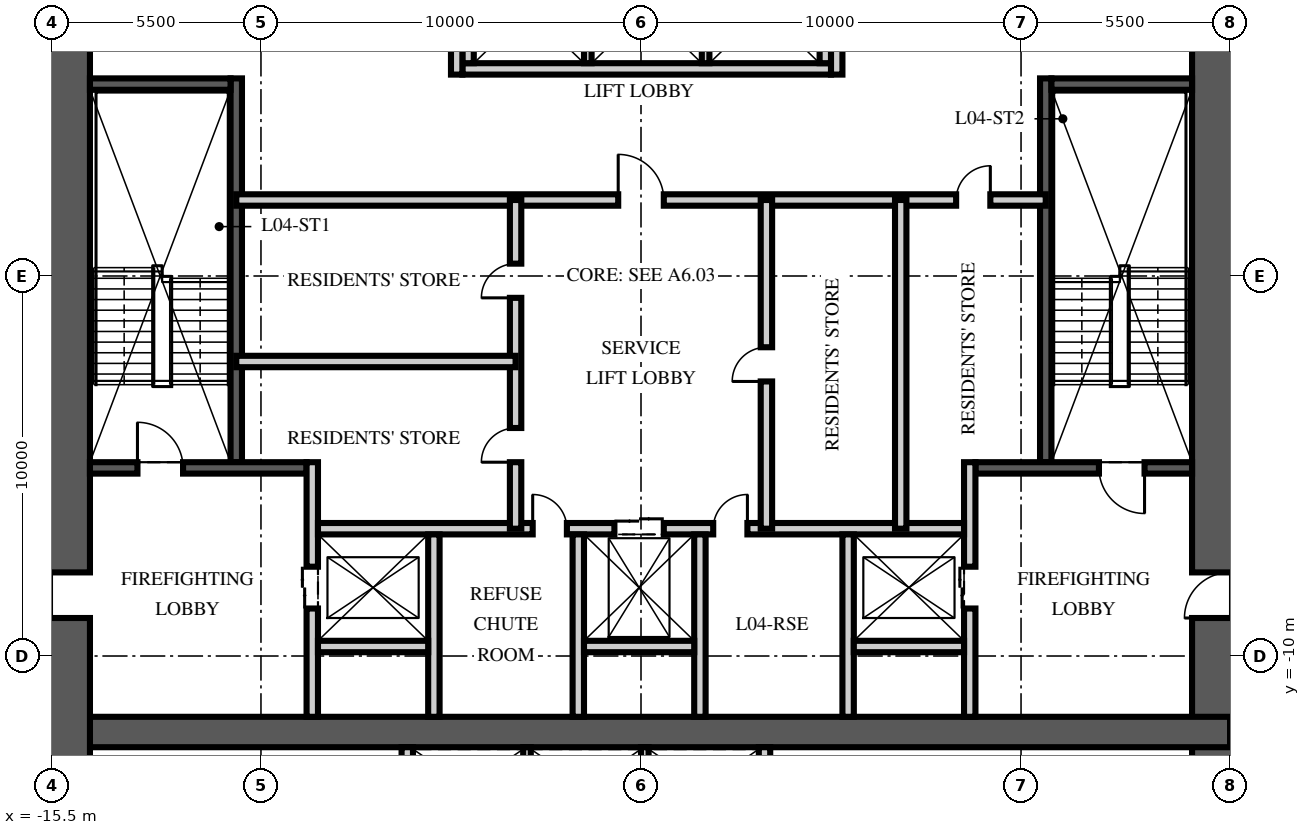
"""IFC4 building model, lengths in metres.
Left out: names, types, materials, properties, quantities, classifications, styles, units other than length and angle.
Written with IfcOpenShell. Run it as: python <this file> out.ifc"""

import sys

from ifc_helpers import new_model, si_unit, direction, frame, frame_2d, origin, place, context, subcontext, project, spatial, rectangle, extrude, element, fill, save


model = new_model("IFC4")
c1 = context("Model", 3, precision=1e-05, world=origin(), true_north=direction((0.0, 1.0)))
c2 = subcontext(c1, "Body", "Model", "MODEL_VIEW")
j1 = project(units=[si_unit("LENGTHUNIT", "METRE"), si_unit("PLANEANGLEUNIT", "RADIAN")], contexts=[c1])
p1 = place(None, origin())
s1 = spatial("IfcSite", under=j1, at=p1, CompositionType="ELEMENT")
p2 = place(p1, origin())
s2 = spatial("IfcBuilding", under=s1, at=p2, CompositionType="ELEMENT")
p3 = place(p2, frame((0.0, 0.0, 21.0)))
s3 = spatial("IfcBuildingStorey", under=s2, at=p3, CompositionType="ELEMENT", Elevation=21.0)
p4 = place(p3, frame((15.5, -15.5, -0.25), z_axis=(0.0, 0.0, 1.0), x_axis=(0.0, 1.0, 0.0)))
e1 = element("IfcWall", 1, at=p4, inside=s3, PredefinedType="SHEAR", context=c2, shape_type="SweptSolid", body=[
    extrude(rectangle(XDim=31.0, YDim=2.0, at=frame_2d((15.5, 0.0))), origin(), (0.0, 0.0, 1.0), 3.75),
])
p5 = place(p4, frame((6.5, 0.0, 0.25)))
e2 = element("IfcOpeningElement", 2, at=p5, cuts=e1, PredefinedType="OPENING", context=c2, shape_type="SweptSolid", body=[
    extrude(rectangle(XDim=1.2, YDim=2.1, at=frame_2d((0.6, 1.05))), frame((0.0, 1.01, 0.0), z_axis=(0.0, -1.0, 0.0), x_axis=(1.0, 0.0, 0.0)), (0.0, 0.0, 1.0), 2.02),
])
p6 = place(p4, frame((23.0, 0.0, 0.25)))
e3 = element("IfcOpeningElement", 3, at=p6, cuts=e1, PredefinedType="OPENING", context=c2, shape_type="SweptSolid", body=[
    extrude(rectangle(XDim=1.8, YDim=2.1, at=frame_2d((0.9, 1.05))), frame((0.0, 1.01, 0.0), z_axis=(0.0, -1.0, 0.0), x_axis=(1.0, 0.0, 0.0)), (0.0, 0.0, 1.0), 2.02),
])
p7 = place(p3, frame((-15.5, -12.0, -0.25), z_axis=(0.0, 0.0, 1.0), x_axis=(1.0, 0.0, 0.0)))
e4 = element("IfcWall", 4, at=p7, inside=s3, PredefinedType="SHEAR", context=c2, shape_type="SweptSolid", body=[
    extrude(rectangle(XDim=31.0, YDim=0.8, at=frame_2d((15.5, 0.0))), origin(), (0.0, 0.0, 1.0), 3.75),
])
p8 = place(p3, frame((-15.5, -15.5, -0.25), z_axis=(0.0, 0.0, 1.0), x_axis=(0.0, 1.0, 0.0)))
e5 = element("IfcWall", 5, at=p8, inside=s3, PredefinedType="SHEAR", context=c2, shape_type="SweptSolid", body=[
    extrude(rectangle(XDim=31.0, YDim=2.0, at=frame_2d((15.5, 0.0))), origin(), (0.0, 0.0, 1.0), 3.75),
])
p9 = place(p8, frame((6.5, 0.0, 0.25)))
e6 = element("IfcOpeningElement", 6, at=p9, cuts=e5, PredefinedType="OPENING", context=c2, shape_type="SweptSolid", body=[
    extrude(rectangle(XDim=1.2, YDim=2.1, at=frame_2d((0.6, 1.05))), frame((0.0, 1.01, 0.0), z_axis=(0.0, -1.0, 0.0), x_axis=(1.0, 0.0, 0.0)), (0.0, 0.0, 1.0), 2.02),
])
p10 = place(p8, frame((23.0, 0.0, 0.25)))
e7 = element("IfcOpeningElement", 7, at=p10, cuts=e5, PredefinedType="OPENING", context=c2, shape_type="SweptSolid", body=[
    extrude(rectangle(XDim=1.8, YDim=2.1, at=frame_2d((0.9, 1.05))), frame((0.0, 1.01, 0.0), z_axis=(0.0, -1.0, 0.0), x_axis=(1.0, 0.0, 0.0)), (0.0, 0.0, 1.0), 2.02),
])
p11 = place(p3, frame((-10.65, -4.9, 0.0), z_axis=(0.0, 0.0, 1.0), x_axis=(0.0, 1.0, 0.0)))
e8 = element("IfcWall", 8, at=p11, inside=s3, PredefinedType="SOLIDWALL", context=c2, shape_type="SweptSolid", body=[
    extrude(rectangle(XDim=10.1, YDim=0.3, at=frame_2d((5.05, 0.0))), origin(), (0.0, 0.0, 1.0), 3.5),
])
p12 = place(p3, frame((-14.5, -5.05, 0.0), z_axis=(0.0, 0.0, 1.0), x_axis=(1.0, 0.0, 0.0)))
e9 = element("IfcWall", 9, at=p12, inside=s3, PredefinedType="SOLIDWALL", context=c2, shape_type="SweptSolid", body=[
    extrude(rectangle(XDim=5.7, YDim=0.3, at=frame_2d((2.85, 0.0))), origin(), (0.0, 0.0, 1.0), 3.5),
])
p13 = place(p12, frame((1.25, 0.0, 0.0)))
e10 = element("IfcOpeningElement", 10, at=p13, cuts=e9, PredefinedType="OPENING", context=c2, shape_type="SweptSolid", body=[
    extrude(rectangle(XDim=1.2, YDim=2.1, at=frame_2d((0.6, 1.05))), frame((0.0, 0.16, 0.0), z_axis=(0.0, -1.0, 0.0), x_axis=(1.0, 0.0, 0.0)), (0.0, 0.0, 1.0), 0.32),
])
p14 = place(p3, frame((-14.5, 5.05, 0.0), z_axis=(0.0, 0.0, 1.0), x_axis=(1.0, 0.0, 0.0)))
e11 = element("IfcWall", 11, at=p14, inside=s3, PredefinedType="SOLIDWALL", context=c2, shape_type="SweptSolid", body=[
    extrude(rectangle(XDim=3.7, YDim=0.3, at=frame_2d((1.85, 0.0))), origin(), (0.0, 0.0, 1.0), 3.5),
])
p15 = place(p3, frame((-8.65, -11.6, 0.0), z_axis=(0.0, 0.0, 1.0), x_axis=(0.0, 1.0, 0.0)))
e12 = element("IfcWall", 12, at=p15, inside=s3, PredefinedType="PARTITIONING", context=c2, shape_type="SweptSolid", body=[
    extrude(rectangle(XDim=6.7, YDim=0.3, at=frame_2d((3.35, 0.0))), origin(), (0.0, 0.0, 1.0), 3.5),
])
p16 = place(p15, frame((2.85, 0.0, 0.0)))
e13 = element("IfcOpeningElement", 13, at=p16, cuts=e12, PredefinedType="OPENING", context=c2, shape_type="SweptSolid", body=[
    extrude(rectangle(XDim=1.1, YDim=2.1, at=frame_2d((0.55, 1.05))), frame((0.0, 0.16, 0.0), z_axis=(0.0, -1.0, 0.0), x_axis=(1.0, 0.0, 0.0)), (0.0, 0.0, 1.0), 0.32),
])
p17 = place(p3, frame((10.65, -4.9, 0.0), z_axis=(0.0, 0.0, 1.0), x_axis=(0.0, 1.0, 0.0)))
e14 = element("IfcWall", 14, at=p17, inside=s3, PredefinedType="SOLIDWALL", context=c2, shape_type="SweptSolid", body=[
    extrude(rectangle(XDim=10.1, YDim=0.3, at=frame_2d((5.05, 0.0))), origin(), (0.0, 0.0, 1.0), 3.5),
])
p18 = place(p3, frame((14.5, -5.05, 0.0), z_axis=(0.0, 0.0, 1.0), x_axis=(-1.0, 0.0, 0.0)))
e15 = element("IfcWall", 15, at=p18, inside=s3, PredefinedType="SOLIDWALL", context=c2, shape_type="SweptSolid", body=[
    extrude(rectangle(XDim=5.7, YDim=0.3, at=frame_2d((2.85, 0.0))), origin(), (0.0, 0.0, 1.0), 3.5),
])
p19 = place(p18, frame((1.25, 0.0, 0.0)))
e16 = element("IfcOpeningElement", 16, at=p19, cuts=e15, PredefinedType="OPENING", context=c2, shape_type="SweptSolid", body=[
    extrude(rectangle(XDim=1.2, YDim=2.1, at=frame_2d((0.6, 1.05))), frame((0.0, 0.16, 0.0), z_axis=(0.0, -1.0, 0.0), x_axis=(1.0, 0.0, 0.0)), (0.0, 0.0, 1.0), 0.32),
])
p20 = place(p3, frame((14.5, 5.05, 0.0), z_axis=(0.0, 0.0, 1.0), x_axis=(-1.0, 0.0, 0.0)))
e17 = element("IfcWall", 17, at=p20, inside=s3, PredefinedType="SOLIDWALL", context=c2, shape_type="SweptSolid", body=[
    extrude(rectangle(XDim=3.7, YDim=0.3, at=frame_2d((1.85, 0.0))), origin(), (0.0, 0.0, 1.0), 3.5),
])
p21 = place(p3, frame((8.65, -11.6, 0.0), z_axis=(0.0, 0.0, 1.0), x_axis=(0.0, 1.0, 0.0)))
e18 = element("IfcWall", 18, at=p21, inside=s3, PredefinedType="PARTITIONING", context=c2, shape_type="SweptSolid", body=[
    extrude(rectangle(XDim=6.7, YDim=0.3, at=frame_2d((3.35, 0.0))), origin(), (0.0, 0.0, 1.0), 3.5),
])
p22 = place(p21, frame((2.85, 0.0, 0.0)))
e19 = element("IfcOpeningElement", 19, at=p22, cuts=e18, PredefinedType="OPENING", context=c2, shape_type="SweptSolid", body=[
    extrude(rectangle(XDim=1.1, YDim=2.1, at=frame_2d((0.55, 1.05))), frame((0.0, 0.16, 0.0), z_axis=(0.0, -1.0, 0.0), x_axis=(1.0, 0.0, 0.0)), (0.0, 0.0, 1.0), 0.32),
])
p23 = place(p3, frame((-8.5, -6.65, 0.0), z_axis=(0.0, 0.0, 1.0), x_axis=(1.0, 0.0, 0.0)))
e20 = element("IfcWall", 20, at=p23, inside=s3, PredefinedType="PARTITIONING", context=c2, shape_type="SweptSolid", body=[
    extrude(rectangle(XDim=17.0, YDim=0.3, at=frame_2d((8.5, 0.0))), origin(), (0.0, 0.0, 1.0), 3.5),
])
p24 = place(p23, frame((7.8, 0.0, 0.0)))
e21 = element("IfcOpeningElement", 21, at=p24, cuts=e20, PredefinedType="OPENING", context=c2, shape_type="SweptSolid", body=[
    extrude(rectangle(XDim=1.3, YDim=2.4, at=frame_2d((0.65, 1.2))), frame((0.0, 0.16, 0.0), z_axis=(0.0, -1.0, 0.0), x_axis=(1.0, 0.0, 0.0)), (0.0, 0.0, 1.0), 0.32),
])
p25 = place(p23, frame((5.65, 0.0, 0.0)))
e22 = element("IfcOpeningElement", 22, at=p25, cuts=e20, PredefinedType="OPENING", context=c2, shape_type="SweptSolid", body=[
    extrude(rectangle(XDim=0.9, YDim=2.1, at=frame_2d((0.45, 1.05))), frame((0.0, 0.16, 0.0), z_axis=(0.0, -1.0, 0.0), x_axis=(1.0, 0.0, 0.0)), (0.0, 0.0, 1.0), 0.32),
])
p26 = place(p23, frame((10.4, 0.0, 0.0)))
e23 = element("IfcOpeningElement", 23, at=p26, cuts=e20, PredefinedType="OPENING", context=c2, shape_type="SweptSolid", body=[
    extrude(rectangle(XDim=0.9, YDim=2.1, at=frame_2d((0.45, 1.05))), frame((0.0, 0.16, 0.0), z_axis=(0.0, -1.0, 0.0), x_axis=(1.0, 0.0, 0.0)), (0.0, 0.0, 1.0), 0.32),
])
for number, where, z_axis, x_axis in (
    (24, (-5.45, -11.6, 0.0), (0.0, 0.0, 1.0), (0.0, 1.0, 0.0)),
    (25, (-1.65, -11.6, 0.0), (0.0, 0.0, 1.0), (0.0, 1.0, 0.0)),
    (26, (1.55, -11.6, 0.0), (0.0, 0.0, 1.0), (0.0, 1.0, 0.0)),
    (27, (5.45, -11.6, 0.0), (0.0, 0.0, 1.0), (0.0, 1.0, 0.0)),
):
    element("IfcWall", number, at=place(p3, frame(where, z_axis=z_axis, x_axis=x_axis)), inside=s3, PredefinedType="PARTITIONING", context=c2, shape_type="SweptSolid", body=[
        extrude(rectangle(XDim=4.8, YDim=0.3, at=frame_2d((2.4, 0.0))), origin(), (0.0, 0.0, 1.0), 3.5),
    ])
for number, where, z_axis, x_axis in (
    (28, (-8.5, -9.75, 0.0), (0.0, 0.0, 1.0), (1.0, 0.0, 0.0)),
    (29, (-1.5, -9.75, 0.0), (0.0, 0.0, 1.0), (1.0, 0.0, 0.0)),
    (30, (5.6, -9.75, 0.0), (0.0, 0.0, 1.0), (1.0, 0.0, 0.0)),
):
    element("IfcWall", number, at=place(p3, frame(where, z_axis=z_axis, x_axis=x_axis)), inside=s3, PredefinedType="PARTITIONING", context=c2, shape_type="SweptSolid", body=[
        extrude(rectangle(XDim=2.9, YDim=0.3, at=frame_2d((1.45, 0.0))), origin(), (0.0, 0.0, 1.0), 3.5),
    ])
p27 = place(p3, frame((-4.7, 5.45, 0.0), z_axis=(0.0, 0.0, 1.0), x_axis=(1.0, 0.0, 0.0)))
e31 = element("IfcWall", 31, at=p27, inside=s3, PredefinedType="PARTITIONING", context=c2, shape_type="SweptSolid", body=[
    extrude(rectangle(XDim=9.7, YDim=0.3, at=frame_2d((4.85, 0.0))), origin(), (0.0, 0.0, 1.0), 3.5),
])
for number, where, z_axis, x_axis in (
    (32, (-4.55, 5.6, 0.0), (0.0, 0.0, 1.0), (0.0, 1.0, 0.0)),
    (33, (4.85, 5.6, 0.0), (0.0, 0.0, 1.0), (0.0, 1.0, 0.0)),
):
    element("IfcWall", number, at=place(p3, frame(where, z_axis=z_axis, x_axis=x_axis)), inside=s3, PredefinedType="PARTITIONING", context=c2, shape_type="SweptSolid", body=[
        extrude(rectangle(XDim=2.8, YDim=0.3, at=frame_2d((1.4, 0.0))), origin(), (0.0, 0.0, 1.0), 3.5),
    ])
for number, where, z_axis, x_axis in (
    (34, (-1.4, 5.6, 0.0), (0.0, 0.0, 1.0), (0.0, 1.0, 0.0)),
    (35, (1.7, 5.6, 0.0), (0.0, 0.0, 1.0), (0.0, 1.0, 0.0)),
):
    element("IfcWall", number, at=place(p3, frame(where, z_axis=z_axis, x_axis=x_axis)), inside=s3, PredefinedType="PARTITIONING", context=c2, shape_type="SweptSolid", body=[
        extrude(rectangle(XDim=2.8, YDim=0.2, at=frame_2d((1.4, 0.0))), origin(), (0.0, 0.0, 1.0), 3.5),
    ])
for number, where, z_axis, x_axis in (
    (36, (-6.15, -14.5, 0.0), (0.0, 0.0, 1.0), (0.0, 1.0, 0.0)),
    (37, (3.25, -14.5, 0.0), (0.0, 0.0, 1.0), (0.0, 1.0, 0.0)),
):
    element("IfcWall", number, at=place(p3, frame(where, z_axis=z_axis, x_axis=x_axis)), inside=s3, PredefinedType="PARTITIONING", context=c2, shape_type="SweptSolid", body=[
        extrude(rectangle(XDim=2.1, YDim=0.3, at=frame_2d((1.05, 0.0))), origin(), (0.0, 0.0, 1.0), 3.5),
    ])
for number, where, z_axis, x_axis in (
    (38, (-3.0, -14.5, 0.0), (0.0, 0.0, 1.0), (0.0, 1.0, 0.0)),
    (39, (0.1, -14.5, 0.0), (0.0, 0.0, 1.0), (0.0, 1.0, 0.0)),
):
    element("IfcWall", number, at=place(p3, frame(where, z_axis=z_axis, x_axis=x_axis)), inside=s3, PredefinedType="PARTITIONING", context=c2, shape_type="SweptSolid", body=[
        extrude(rectangle(XDim=2.1, YDim=0.2, at=frame_2d((1.05, 0.0))), origin(), (0.0, 0.0, 1.0), 3.5),
    ])
p28 = place(p3, frame((-10.65, 2.0, 0.0), z_axis=(0.0, 0.0, 1.0), x_axis=(1.0, 0.0, 0.0)))
e40 = element("IfcWall", 40, at=p28, inside=s3, PredefinedType="PARTITIONING", context=c2, shape_type="SweptSolid", body=[
    extrude(rectangle(XDim=21.3, YDim=0.3, at=frame_2d((10.65, 0.0))), origin(), (0.0, 0.0, 1.0), 3.5),
])
p29 = place(p28, frame((10.05, 0.0, 0.0)))
e41 = element("IfcOpeningElement", 41, at=p29, cuts=e40, PredefinedType="OPENING", context=c2, shape_type="SweptSolid", body=[
    extrude(rectangle(XDim=1.2, YDim=2.1, at=frame_2d((0.6, 1.05))), frame((0.0, 0.16, 0.0), z_axis=(0.0, -1.0, 0.0), x_axis=(1.0, 0.0, 0.0)), (0.0, 0.0, 1.0), 0.32),
])
p30 = place(p28, frame((18.942, 0.0, 0.0)))
e42 = element("IfcOpeningElement", 42, at=p30, cuts=e40, PredefinedType="OPENING", context=c2, shape_type="SweptSolid", body=[
    extrude(rectangle(XDim=0.9, YDim=2.1, at=frame_2d((0.45, 1.05))), frame((0.0, 0.16, 0.0), z_axis=(0.0, -1.0, 0.0), x_axis=(1.0, 0.0, 0.0)), (0.0, 0.0, 1.0), 0.32),
])
p31 = place(p3, frame((-3.3, -6.65, 0.0), z_axis=(0.0, 0.0, 1.0), x_axis=(0.0, 1.0, 0.0)))
e43 = element("IfcWall", 43, at=p31, inside=s3, PredefinedType="PARTITIONING", context=c2, shape_type="SweptSolid", body=[
    extrude(rectangle(XDim=8.65, YDim=0.3, at=frame_2d((4.325, 0.0))), origin(), (0.0, 0.0, 1.0), 3.5),
])
p32 = place(p31, frame((1.75, 0.0, 0.0)))
e44 = element("IfcOpeningElement", 44, at=p32, cuts=e43, PredefinedType="OPENING", context=c2, shape_type="SweptSolid", body=[
    extrude(rectangle(XDim=0.9, YDim=2.1, at=frame_2d((0.45, 1.05))), frame((0.0, 0.16, 0.0), z_axis=(0.0, -1.0, 0.0), x_axis=(1.0, 0.0, 0.0)), (0.0, 0.0, 1.0), 0.32),
])
p33 = place(p31, frame((6.075, 0.0, 0.0)))
e45 = element("IfcOpeningElement", 45, at=p33, cuts=e43, PredefinedType="OPENING", context=c2, shape_type="SweptSolid", body=[
    extrude(rectangle(XDim=0.9, YDim=2.1, at=frame_2d((0.45, 1.05))), frame((0.0, 0.16, 0.0), z_axis=(0.0, -1.0, 0.0), x_axis=(1.0, 0.0, 0.0)), (0.0, 0.0, 1.0), 0.32),
])
p34 = place(p3, frame((3.3, -6.65, 0.0), z_axis=(0.0, 0.0, 1.0), x_axis=(0.0, 1.0, 0.0)))
e46 = element("IfcWall", 46, at=p34, inside=s3, PredefinedType="PARTITIONING", context=c2, shape_type="SweptSolid", body=[
    extrude(rectangle(XDim=8.65, YDim=0.3, at=frame_2d((4.325, 0.0))), origin(), (0.0, 0.0, 1.0), 3.5),
])
p35 = place(p34, frame((3.875, 0.0, 0.0)))
e47 = element("IfcOpeningElement", 47, at=p35, cuts=e46, PredefinedType="OPENING", context=c2, shape_type="SweptSolid", body=[
    extrude(rectangle(XDim=0.9, YDim=2.1, at=frame_2d((0.45, 1.05))), frame((0.0, 0.16, 0.0), z_axis=(0.0, -1.0, 0.0), x_axis=(1.0, 0.0, 0.0)), (0.0, 0.0, 1.0), 0.32),
])
p36 = place(p3, frame((-10.65, -2.25, 0.0), z_axis=(0.0, 0.0, 1.0), x_axis=(1.0, 0.0, 0.0)))
e48 = element("IfcWall", 48, at=p36, inside=s3, PredefinedType="PARTITIONING", context=c2, shape_type="SweptSolid", body=[
    extrude(rectangle(XDim=7.35, YDim=0.3, at=frame_2d((3.675, 0.0))), origin(), (0.0, 0.0, 1.0), 3.5),
])
p37 = place(p3, frame((6.834, -6.65, 0.0), z_axis=(0.0, 0.0, 1.0), x_axis=(0.0, 1.0, 0.0)))
e49 = element("IfcWall", 49, at=p37, inside=s3, PredefinedType="PARTITIONING", context=c2, shape_type="SweptSolid", body=[
    extrude(rectangle(XDim=8.65, YDim=0.3, at=frame_2d((4.325, 0.0))), origin(), (0.0, 0.0, 1.0), 3.5),
])
p38 = place(p3, frame((-4.85, 5.3, 0.0), z_axis=(0.0, 0.0, 1.0), x_axis=(0.0, 1.0, 0.0)))
e50 = element("IfcWall", 50, at=p38, inside=s3, PredefinedType="PARTITIONING", context=c2, shape_type="SweptSolid", body=[
    extrude(rectangle(XDim=6.3, YDim=0.3, at=frame_2d((3.15, 0.0))), origin(), (0.0, 0.0, 1.0), 3.5),
])
p39 = place(p38, frame((4.35, 0.0, 0.0)))
e51 = element("IfcOpeningElement", 51, at=p39, cuts=e50, PredefinedType="OPENING", context=c2, shape_type="SweptSolid", body=[
    extrude(rectangle(XDim=0.9, YDim=2.1, at=frame_2d((0.45, 1.05))), frame((0.0, 0.16, 0.0), z_axis=(0.0, -1.0, 0.0), x_axis=(1.0, 0.0, 0.0)), (0.0, 0.0, 1.0), 0.32),
])
p40 = place(p3, frame((5.15, 5.3, 0.0), z_axis=(0.0, 0.0, 1.0), x_axis=(0.0, 1.0, 0.0)))
e52 = element("IfcWall", 52, at=p40, inside=s3, PredefinedType="PARTITIONING", context=c2, shape_type="SweptSolid", body=[
    extrude(rectangle(XDim=6.3, YDim=0.3, at=frame_2d((3.15, 0.0))), origin(), (0.0, 0.0, 1.0), 3.5),
])
p41 = place(p13, origin())
e53 = element("IfcDoor", 53, at=p41, inside=s3, OperationType="SINGLE_SWING_LEFT", PredefinedType="DOOR", context=c2, shape_type="SweptSolid", body=[
    extrude(rectangle(XDim=1.2, YDim=2.1, at=frame_2d((0.6, 1.05))), frame((0.0, 0.025, 0.0), z_axis=(0.0, -1.0, 0.0), x_axis=(1.0, 0.0, 0.0)), (0.0, 0.0, 1.0), 0.05),
])
fill(e10, e53)
p42 = place(p9, origin())
e54 = element("IfcDoor", 54, at=p42, inside=s3, OperationType="SINGLE_SWING_LEFT", PredefinedType="DOOR", context=c2, shape_type="SweptSolid", body=[
    extrude(rectangle(XDim=1.2, YDim=2.1, at=frame_2d((0.6, 1.05))), frame((0.0, 0.025, 0.0), z_axis=(0.0, -1.0, 0.0), x_axis=(1.0, 0.0, 0.0)), (0.0, 0.0, 1.0), 0.05),
])
fill(e6, e54)
p43 = place(p19, origin())
e55 = element("IfcDoor", 55, at=p43, inside=s3, OperationType="SINGLE_SWING_LEFT", PredefinedType="DOOR", context=c2, shape_type="SweptSolid", body=[
    extrude(rectangle(XDim=1.2, YDim=2.1, at=frame_2d((0.6, 1.05))), frame((0.0, 0.025, 0.0), z_axis=(0.0, -1.0, 0.0), x_axis=(1.0, 0.0, 0.0)), (0.0, 0.0, 1.0), 0.05),
])
fill(e16, e55)
p44 = place(p5, origin())
e56 = element("IfcDoor", 56, at=p44, inside=s3, OperationType="SINGLE_SWING_LEFT", PredefinedType="DOOR", context=c2, shape_type="SweptSolid", body=[
    extrude(rectangle(XDim=1.2, YDim=2.1, at=frame_2d((0.6, 1.05))), frame((0.0, 0.025, 0.0), z_axis=(0.0, -1.0, 0.0), x_axis=(1.0, 0.0, 0.0)), (0.0, 0.0, 1.0), 0.05),
])
fill(e2, e56)
p45 = place(p16, origin())
e57 = element("IfcDoor", 57, at=p45, inside=s3, OperationType="DOUBLE_DOOR_SLIDING", PredefinedType="DOOR", context=c2, shape_type="SweptSolid", body=[
    extrude(rectangle(XDim=1.1, YDim=2.1, at=frame_2d((0.55, 1.05))), frame((0.0, 0.025, 0.0), z_axis=(0.0, -1.0, 0.0), x_axis=(1.0, 0.0, 0.0)), (0.0, 0.0, 1.0), 0.05),
])
fill(e13, e57)
p46 = place(p22, origin())
e58 = element("IfcDoor", 58, at=p46, inside=s3, OperationType="DOUBLE_DOOR_SLIDING", PredefinedType="DOOR", context=c2, shape_type="SweptSolid", body=[
    extrude(rectangle(XDim=1.1, YDim=2.1, at=frame_2d((0.55, 1.05))), frame((0.0, 0.025, 0.0), z_axis=(0.0, -1.0, 0.0), x_axis=(1.0, 0.0, 0.0)), (0.0, 0.0, 1.0), 0.05),
])
fill(e19, e58)
p47 = place(p24, origin())
e59 = element("IfcDoor", 59, at=p47, inside=s3, OperationType="DOUBLE_DOOR_SLIDING", PredefinedType="DOOR", context=c2, shape_type="SweptSolid", body=[
    extrude(rectangle(XDim=1.3, YDim=2.4, at=frame_2d((0.65, 1.2))), frame((0.0, 0.025, 0.0), z_axis=(0.0, -1.0, 0.0), x_axis=(1.0, 0.0, 0.0)), (0.0, 0.0, 1.0), 0.05),
])
fill(e21, e59)
p48 = place(p29, origin())
e60 = element("IfcDoor", 60, at=p48, inside=s3, OperationType="SINGLE_SWING_LEFT", PredefinedType="DOOR", context=c2, shape_type="SweptSolid", body=[
    extrude(rectangle(XDim=1.2, YDim=2.1, at=frame_2d((0.6, 1.05))), frame((0.0, 0.025, 0.0), z_axis=(0.0, -1.0, 0.0), x_axis=(1.0, 0.0, 0.0)), (0.0, 0.0, 1.0), 0.05),
])
fill(e41, e60)
p49 = place(p25, origin())
e61 = element("IfcDoor", 61, at=p49, inside=s3, OperationType="SINGLE_SWING_LEFT", PredefinedType="DOOR", context=c2, shape_type="SweptSolid", body=[
    extrude(rectangle(XDim=0.9, YDim=2.1, at=frame_2d((0.45, 1.05))), frame((0.0, 0.025, 0.0), z_axis=(0.0, -1.0, 0.0), x_axis=(1.0, 0.0, 0.0)), (0.0, 0.0, 1.0), 0.05),
])
fill(e22, e61)
p50 = place(p26, origin())
e62 = element("IfcDoor", 62, at=p50, inside=s3, OperationType="SINGLE_SWING_RIGHT", PredefinedType="DOOR", context=c2, shape_type="SweptSolid", body=[
    extrude(rectangle(XDim=0.9, YDim=2.1, at=frame_2d((0.45, 1.05))), frame((0.0, 0.025, 0.0), z_axis=(0.0, -1.0, 0.0), x_axis=(1.0, 0.0, 0.0)), (0.0, 0.0, 1.0), 0.05),
])
fill(e23, e62)
p51 = place(p32, origin())
e63 = element("IfcDoor", 63, at=p51, inside=s3, OperationType="SINGLE_SWING_LEFT", PredefinedType="DOOR", context=c2, shape_type="SweptSolid", body=[
    extrude(rectangle(XDim=0.9, YDim=2.1, at=frame_2d((0.45, 1.05))), frame((0.0, 0.025, 0.0), z_axis=(0.0, -1.0, 0.0), x_axis=(1.0, 0.0, 0.0)), (0.0, 0.0, 1.0), 0.05),
])
fill(e44, e63)
p52 = place(p33, origin())
e64 = element("IfcDoor", 64, at=p52, inside=s3, OperationType="SINGLE_SWING_LEFT", PredefinedType="DOOR", context=c2, shape_type="SweptSolid", body=[
    extrude(rectangle(XDim=0.9, YDim=2.1, at=frame_2d((0.45, 1.05))), frame((0.0, 0.025, 0.0), z_axis=(0.0, -1.0, 0.0), x_axis=(1.0, 0.0, 0.0)), (0.0, 0.0, 1.0), 0.05),
])
fill(e45, e64)
p53 = place(p35, origin())
e65 = element("IfcDoor", 65, at=p53, inside=s3, OperationType="SINGLE_SWING_LEFT", PredefinedType="DOOR", context=c2, shape_type="SweptSolid", body=[
    extrude(rectangle(XDim=0.9, YDim=2.1, at=frame_2d((0.45, 1.05))), frame((0.0, 0.025, 0.0), z_axis=(0.0, -1.0, 0.0), x_axis=(1.0, 0.0, 0.0)), (0.0, 0.0, 1.0), 0.05),
])
fill(e47, e65)
p54 = place(p30, origin())
e66 = element("IfcDoor", 66, at=p54, inside=s3, OperationType="SINGLE_SWING_RIGHT", PredefinedType="DOOR", context=c2, shape_type="SweptSolid", body=[
    extrude(rectangle(XDim=0.9, YDim=2.1, at=frame_2d((0.45, 1.05))), frame((0.0, 0.025, 0.0), z_axis=(0.0, -1.0, 0.0), x_axis=(1.0, 0.0, 0.0)), (0.0, 0.0, 1.0), 0.05),
])
fill(e42, e66)
save(model, sys.argv[1])
